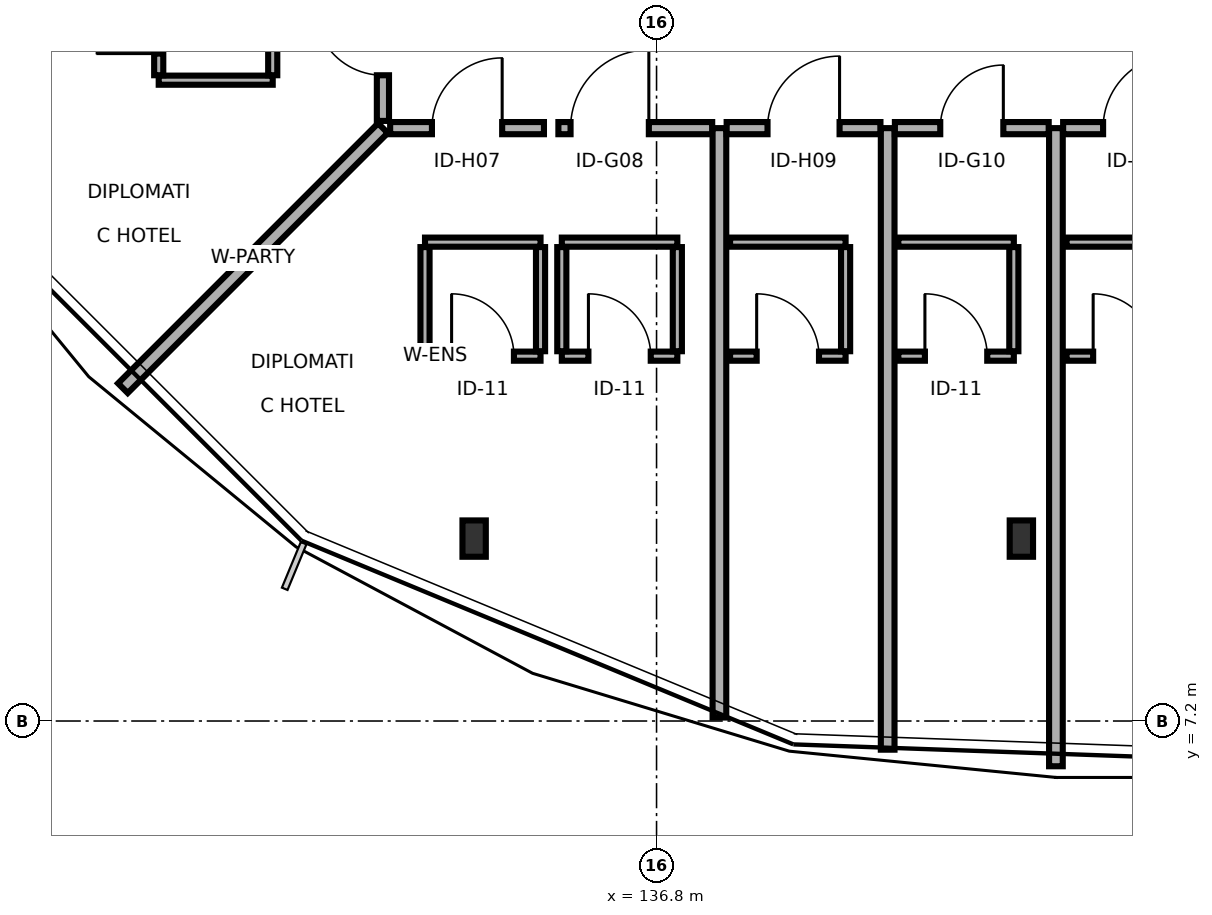
"""IFC4 building model, lengths in metres.
Left out: names, types, materials, properties, quantities, classifications, styles, units other than length and angle.
Written with IfcOpenShell. Run it as: python <this file> out.ifc"""

import sys

from ifc_helpers import new_model, si_unit, direction, frame, frame_2d, origin, origin_2d, place, context, subcontext, project, spatial, rectangle, i_section, extrude, element, fill, save


model = new_model("IFC4")
c1 = context("Model", 3, precision=1e-05, world=origin(), true_north=direction((0.0, 1.0)))
c2 = subcontext(c1, "Body", "Model", "MODEL_VIEW")
j1 = project(units=[si_unit("LENGTHUNIT", "METRE"), si_unit("PLANEANGLEUNIT", "RADIAN")], contexts=[c1])
p1 = place(None, origin())
s1 = spatial("IfcSite", under=j1, at=p1, CompositionType="ELEMENT")
p2 = place(p1, origin())
s2 = spatial("IfcBuilding", under=s1, at=p2, CompositionType="ELEMENT")
p3 = place(p2, frame((0.0, 0.0, 18.1)))
s3 = spatial("IfcBuildingStorey", under=s2, at=p3, CompositionType="ELEMENT", Elevation=18.1)
for number, where, z_axis, x_axis in (
    (1, (134.4, 9.6, 0.0), (0.0, 0.0, 1.0), (1.0, 0.0, 0.0)),
    (2, (141.6, 9.6, 0.0), (0.0, 0.0, 1.0), (1.0, 0.0, 0.0)),
):
    element("IfcColumn", number, at=place(p3, frame(where, z_axis=z_axis, x_axis=x_axis)), inside=s3, PredefinedType="COLUMN", context=c2, shape_type="SweptSolid", body=[
        extrude(i_section(OverallWidth=0.307, OverallDepth=0.478, WebThickness=0.021, FlangeThickness=0.04, FilletRadius=0.027, at=origin_2d()), origin(), (0.0, 0.0, 1.0), 3.4),
    ])
p4 = place(p3, frame((133.295, 15.0, 0.0), z_axis=(0.0, 0.0, 1.0), x_axis=(1.0, 0.0, 0.0)))
e3 = element("IfcWall", 3, at=p4, inside=s3, PredefinedType="PARTITIONING", context=c2, shape_type="SweptSolid", body=[
    extrude(rectangle(XDim=2.024, YDim=0.16, at=frame_2d((1.012, 0.0))), origin(), (0.0, 0.0, 1.0), 3.21),
])
p5 = place(p4, frame((0.55, 0.0, 0.0)))
e4 = element("IfcOpeningElement", 4, at=p5, cuts=e3, PredefinedType="OPENING", context=c2, shape_type="SweptSolid", body=[
    extrude(rectangle(XDim=0.924, YDim=2.16, at=frame_2d((0.462, 1.08))), frame((0.0, 0.09, 0.0), z_axis=(0.0, -1.0, 0.0), x_axis=(1.0, 0.0, 0.0)), (0.0, 0.0, 1.0), 0.18),
])
p6 = place(p3, frame((133.754, 12.0, 0.0), z_axis=(0.0, 0.0, 1.0), x_axis=(1.0, 0.0, 0.0)))
e5 = element("IfcWall", 5, at=p6, inside=s3, PredefinedType="PARTITIONING", context=c2, shape_type="SweptSolid", body=[
    extrude(rectangle(XDim=1.52, YDim=0.12, at=frame_2d((0.76, 0.0))), origin(), (0.0, 0.0, 1.0), 2.745),
])
p7 = place(p6, frame((0.35, 0.0, 0.0)))
e6 = element("IfcOpeningElement", 6, at=p7, cuts=e5, PredefinedType="OPENING", context=c2, shape_type="SweptSolid", body=[
    extrude(rectangle(XDim=0.82, YDim=2.08, at=frame_2d((0.41, 1.04))), frame((0.0, 0.07, 0.0), z_axis=(0.0, -1.0, 0.0), x_axis=(1.0, 0.0, 0.0)), (0.0, 0.0, 1.0), 0.14),
])
p8 = place(p3, frame((133.754, 13.5, 0.0), z_axis=(0.0, 0.0, 1.0), x_axis=(1.0, 0.0, 0.0)))
e7 = element("IfcWall", 7, at=p8, inside=s3, PredefinedType="PARTITIONING", context=c2, shape_type="SweptSolid", body=[
    extrude(rectangle(XDim=1.52, YDim=0.12, at=frame_2d((0.76, 0.0))), origin(), (0.0, 0.0, 1.0), 3.21),
])
p9 = place(p3, frame((133.754, 12.065, 0.0), z_axis=(0.0, 0.0, 1.0), x_axis=(0.0, 1.0, 0.0)))
e8 = element("IfcWall", 8, at=p9, inside=s3, PredefinedType="PARTITIONING", context=c2, shape_type="SweptSolid", body=[
    extrude(rectangle(XDim=1.37, YDim=0.12, at=frame_2d((0.685, 0.0))), origin(), (0.0, 0.0, 1.0), 3.21),
])
p10 = place(p3, frame((135.274, 12.065, 0.0), z_axis=(0.0, 0.0, 1.0), x_axis=(0.0, 1.0, 0.0)))
e9 = element("IfcWall", 9, at=p10, inside=s3, PredefinedType="PARTITIONING", context=c2, shape_type="SweptSolid", body=[
    extrude(rectangle(XDim=1.37, YDim=0.12, at=frame_2d((0.685, 0.0))), origin(), (0.0, 0.0, 1.0), 2.745),
])
p11 = place(p3, frame((133.2, 15.0, 0.0), z_axis=(0.0, 0.0, 1.0), x_axis=(-0.707106781187, -0.707106781187, 0.0)))
e10 = element("IfcWall", 10, at=p11, inside=s3, PredefinedType="PARTITIONING", context=c2, shape_type="SweptSolid", body=[
    extrude(rectangle(XDim=4.839, YDim=0.18, at=frame_2d((2.419, 0.0))), origin(), (0.0, 0.0, 1.0), 2.755),
])
p12 = place(p3, frame((135.509, 15.0, 0.0), z_axis=(0.0, 0.0, 1.0), x_axis=(1.0, 0.0, 0.0)))
e11 = element("IfcWall", 11, at=p12, inside=s3, PredefinedType="PARTITIONING", context=c2, shape_type="SweptSolid", body=[
    extrude(rectangle(XDim=2.024, YDim=0.16, at=frame_2d((1.012, 0.0))), origin(), (0.0, 0.0, 1.0), 2.745),
])
p13 = place(p12, frame((0.16, 0.0, 0.0)))
e12 = element("IfcOpeningElement", 12, at=p13, cuts=e11, PredefinedType="OPENING", context=c2, shape_type="SweptSolid", body=[
    extrude(rectangle(XDim=1.03, YDim=2.05, at=frame_2d((0.515, 1.025))), frame((0.0, 0.09, 0.0), z_axis=(0.0, -1.0, 0.0), x_axis=(1.0, 0.0, 0.0)), (0.0, 0.0, 1.0), 0.18),
])
p14 = place(p3, frame((135.554, 12.0, 0.0), z_axis=(0.0, 0.0, 1.0), x_axis=(1.0, 0.0, 0.0)))
e13 = element("IfcWall", 13, at=p14, inside=s3, PredefinedType="PARTITIONING", context=c2, shape_type="SweptSolid", body=[
    extrude(rectangle(XDim=1.52, YDim=0.12, at=frame_2d((0.76, 0.0))), origin(), (0.0, 0.0, 1.0), 3.21),
])
p15 = place(p14, frame((0.35, 0.0, 0.0)))
e14 = element("IfcOpeningElement", 14, at=p15, cuts=e13, PredefinedType="OPENING", context=c2, shape_type="SweptSolid", body=[
    extrude(rectangle(XDim=0.82, YDim=2.08, at=frame_2d((0.41, 1.04))), frame((0.0, 0.07, 0.0), z_axis=(0.0, -1.0, 0.0), x_axis=(1.0, 0.0, 0.0)), (0.0, 0.0, 1.0), 0.14),
])
p16 = place(p3, frame((135.554, 13.5, 0.0), z_axis=(0.0, 0.0, 1.0), x_axis=(1.0, 0.0, 0.0)))
e15 = element("IfcWall", 15, at=p16, inside=s3, PredefinedType="PARTITIONING", context=c2, shape_type="SweptSolid", body=[
    extrude(rectangle(XDim=1.52, YDim=0.12, at=frame_2d((0.76, 0.0))), origin(), (0.0, 0.0, 1.0), 2.745),
])
p17 = place(p3, frame((135.554, 12.065, 0.0), z_axis=(0.0, 0.0, 1.0), x_axis=(0.0, 1.0, 0.0)))
e16 = element("IfcWall", 16, at=p17, inside=s3, PredefinedType="PARTITIONING", context=c2, shape_type="SweptSolid", body=[
    extrude(rectangle(XDim=1.37, YDim=0.12, at=frame_2d((0.685, 0.0))), origin(), (0.0, 0.0, 1.0), 2.745),
])
p18 = place(p3, frame((137.073, 12.065, 0.0), z_axis=(0.0, 0.0, 1.0), x_axis=(0.0, 1.0, 0.0)))
e17 = element("IfcWall", 17, at=p18, inside=s3, PredefinedType="PARTITIONING", context=c2, shape_type="SweptSolid", body=[
    extrude(rectangle(XDim=1.37, YDim=0.12, at=frame_2d((0.685, 0.0))), origin(), (0.0, 0.0, 1.0), 3.21),
])
p19 = place(p3, frame((137.627, 7.246, 0.0), z_axis=(0.0, 0.0, 1.0), x_axis=(0.0, 1.0, 0.0)))
e18 = element("IfcWall", 18, at=p19, inside=s3, PredefinedType="PARTITIONING", context=c2, shape_type="SweptSolid", body=[
    extrude(rectangle(XDim=7.754, YDim=0.18, at=frame_2d((3.877, 0.0))), origin(), (0.0, 0.0, 1.0), 2.755),
])
p20 = place(p3, frame((137.722, 15.0, 0.0), z_axis=(0.0, 0.0, 1.0), x_axis=(1.0, 0.0, 0.0)))
e19 = element("IfcWall", 19, at=p20, inside=s3, PredefinedType="PARTITIONING", context=c2, shape_type="SweptSolid", body=[
    extrude(rectangle(XDim=2.023, YDim=0.16, at=frame_2d((1.012, 0.0))), origin(), (0.0, 0.0, 1.0), 3.21),
])
p21 = place(p20, frame((0.538, 0.0, 0.0)))
e20 = element("IfcOpeningElement", 20, at=p21, cuts=e19, PredefinedType="OPENING", context=c2, shape_type="SweptSolid", body=[
    extrude(rectangle(XDim=0.948, YDim=2.1, at=frame_2d((0.474, 1.05))), frame((0.0, 0.09, 0.0), z_axis=(0.0, -1.0, 0.0), x_axis=(1.0, 0.0, 0.0)), (0.0, 0.0, 1.0), 0.18),
])
p22 = place(p3, frame((137.767, 12.0, 0.0), z_axis=(0.0, 0.0, 1.0), x_axis=(1.0, 0.0, 0.0)))
e21 = element("IfcWall", 21, at=p22, inside=s3, PredefinedType="PARTITIONING", context=c2, shape_type="SweptSolid", body=[
    extrude(rectangle(XDim=1.52, YDim=0.12, at=frame_2d((0.76, 0.0))), origin(), (0.0, 0.0, 1.0), 3.21),
])
p23 = place(p22, frame((0.35, 0.0, 0.0)))
e22 = element("IfcOpeningElement", 22, at=p23, cuts=e21, PredefinedType="OPENING", context=c2, shape_type="SweptSolid", body=[
    extrude(rectangle(XDim=0.82, YDim=2.08, at=frame_2d((0.41, 1.04))), frame((0.0, 0.07, 0.0), z_axis=(0.0, -1.0, 0.0), x_axis=(1.0, 0.0, 0.0)), (0.0, 0.0, 1.0), 0.14),
])
p24 = place(p3, frame((137.767, 13.5, 0.0), z_axis=(0.0, 0.0, 1.0), x_axis=(1.0, 0.0, 0.0)))
e23 = element("IfcWall", 23, at=p24, inside=s3, PredefinedType="PARTITIONING", context=c2, shape_type="SweptSolid", body=[
    extrude(rectangle(XDim=1.52, YDim=0.12, at=frame_2d((0.76, 0.0))), origin(), (0.0, 0.0, 1.0), 3.21),
])
p25 = place(p3, frame((139.287, 12.065, 0.0), z_axis=(0.0, 0.0, 1.0), x_axis=(0.0, 1.0, 0.0)))
e24 = element("IfcWall", 24, at=p25, inside=s3, PredefinedType="PARTITIONING", context=c2, shape_type="SweptSolid", body=[
    extrude(rectangle(XDim=1.37, YDim=0.12, at=frame_2d((0.685, 0.0))), origin(), (0.0, 0.0, 1.0), 3.21),
])
p26 = place(p3, frame((139.841, 6.823, 0.0), z_axis=(0.0, 0.0, 1.0), x_axis=(0.0, 1.0, 0.0)))
e25 = element("IfcWall", 25, at=p26, inside=s3, PredefinedType="PARTITIONING", context=c2, shape_type="SweptSolid", body=[
    extrude(rectangle(XDim=8.177, YDim=0.18, at=frame_2d((4.089, 0.0))), origin(), (0.0, 0.0, 1.0), 2.755),
])
p27 = place(p3, frame((139.936, 15.0, 0.0), z_axis=(0.0, 0.0, 1.0), x_axis=(1.0, 0.0, 0.0)))
e26 = element("IfcWall", 26, at=p27, inside=s3, PredefinedType="PARTITIONING", context=c2, shape_type="SweptSolid", body=[
    extrude(rectangle(XDim=2.024, YDim=0.16, at=frame_2d((1.012, 0.0))), origin(), (0.0, 0.0, 1.0), 2.745),
])
p28 = place(p27, frame((0.597, 0.0, 0.0)))
e27 = element("IfcOpeningElement", 27, at=p28, cuts=e26, PredefinedType="OPENING", context=c2, shape_type="SweptSolid", body=[
    extrude(rectangle(XDim=0.83, YDim=2.11, at=frame_2d((0.415, 1.055))), frame((0.0, 0.09, 0.0), z_axis=(0.0, -1.0, 0.0), x_axis=(1.0, 0.0, 0.0)), (0.0, 0.0, 1.0), 0.18),
])
p29 = place(p3, frame((139.981, 12.0, 0.0), z_axis=(0.0, 0.0, 1.0), x_axis=(1.0, 0.0, 0.0)))
e28 = element("IfcWall", 28, at=p29, inside=s3, PredefinedType="PARTITIONING", context=c2, shape_type="SweptSolid", body=[
    extrude(rectangle(XDim=1.52, YDim=0.12, at=frame_2d((0.76, 0.0))), origin(), (0.0, 0.0, 1.0), 2.745),
])
p30 = place(p29, frame((0.35, 0.0, 0.0)))
e29 = element("IfcOpeningElement", 29, at=p30, cuts=e28, PredefinedType="OPENING", context=c2, shape_type="SweptSolid", body=[
    extrude(rectangle(XDim=0.82, YDim=2.08, at=frame_2d((0.41, 1.04))), frame((0.0, 0.07, 0.0), z_axis=(0.0, -1.0, 0.0), x_axis=(1.0, 0.0, 0.0)), (0.0, 0.0, 1.0), 0.14),
])
p31 = place(p3, frame((139.981, 13.5, 0.0), z_axis=(0.0, 0.0, 1.0), x_axis=(1.0, 0.0, 0.0)))
e30 = element("IfcWall", 30, at=p31, inside=s3, PredefinedType="PARTITIONING", context=c2, shape_type="SweptSolid", body=[
    extrude(rectangle(XDim=1.52, YDim=0.12, at=frame_2d((0.76, 0.0))), origin(), (0.0, 0.0, 1.0), 2.745),
])
p32 = place(p3, frame((141.501, 12.065, 0.0), z_axis=(0.0, 0.0, 1.0), x_axis=(0.0, 1.0, 0.0)))
e31 = element("IfcWall", 31, at=p32, inside=s3, PredefinedType="PARTITIONING", context=c2, shape_type="SweptSolid", body=[
    extrude(rectangle(XDim=1.37, YDim=0.12, at=frame_2d((0.685, 0.0))), origin(), (0.0, 0.0, 1.0), 2.745),
])
p33 = place(p3, frame((142.054, 6.605, 0.0), z_axis=(0.0, 0.0, 1.0), x_axis=(0.0, 1.0, 0.0)))
e32 = element("IfcWall", 32, at=p33, inside=s3, PredefinedType="PARTITIONING", context=c2, shape_type="SweptSolid", body=[
    extrude(rectangle(XDim=8.395, YDim=0.18, at=frame_2d((4.198, 0.0))), origin(), (0.0, 0.0, 1.0), 2.755),
])
p34 = place(p3, frame((142.149, 15.0, 0.0), z_axis=(0.0, 0.0, 1.0), x_axis=(1.0, 0.0, 0.0)))
e33 = element("IfcWall", 33, at=p34, inside=s3, PredefinedType="PARTITIONING", context=c2, shape_type="SweptSolid", body=[
    extrude(rectangle(XDim=2.024, YDim=0.16, at=frame_2d((1.012, 0.0))), origin(), (0.0, 0.0, 1.0), 3.21),
])
p35 = place(p34, frame((0.526, 0.0, 0.0)))
e34 = element("IfcOpeningElement", 34, at=p35, cuts=e33, PredefinedType="OPENING", context=c2, shape_type="SweptSolid", body=[
    extrude(rectangle(XDim=0.972, YDim=2.16, at=frame_2d((0.486, 1.08))), frame((0.0, 0.09, 0.0), z_axis=(0.0, -1.0, 0.0), x_axis=(1.0, 0.0, 0.0)), (0.0, 0.0, 1.0), 0.18),
])
p36 = place(p3, frame((142.195, 12.0, 0.0), z_axis=(0.0, 0.0, 1.0), x_axis=(1.0, 0.0, 0.0)))
e35 = element("IfcWall", 35, at=p36, inside=s3, PredefinedType="PARTITIONING", context=c2, shape_type="SweptSolid", body=[
    extrude(rectangle(XDim=1.52, YDim=0.12, at=frame_2d((0.76, 0.0))), origin(), (0.0, 0.0, 1.0), 3.21),
])
p37 = place(p36, frame((0.35, 0.0, 0.0)))
e36 = element("IfcOpeningElement", 36, at=p37, cuts=e35, PredefinedType="OPENING", context=c2, shape_type="SweptSolid", body=[
    extrude(rectangle(XDim=0.82, YDim=2.08, at=frame_2d((0.41, 1.04))), frame((0.0, 0.07, 0.0), z_axis=(0.0, -1.0, 0.0), x_axis=(1.0, 0.0, 0.0)), (0.0, 0.0, 1.0), 0.14),
])
p38 = place(p3, frame((142.195, 13.5, 0.0), z_axis=(0.0, 0.0, 1.0), x_axis=(1.0, 0.0, 0.0)))
e37 = element("IfcWall", 37, at=p38, inside=s3, PredefinedType="PARTITIONING", context=c2, shape_type="SweptSolid", body=[
    extrude(rectangle(XDim=1.52, YDim=0.12, at=frame_2d((0.76, 0.0))), origin(), (0.0, 0.0, 1.0), 3.21),
])
p39 = place(p3, frame((133.2, 15.095, 0.0), z_axis=(0.0, 0.0, 1.0), x_axis=(0.0, 1.0, 0.0)))
e38 = element("IfcWall", 38, at=p39, inside=s3, PredefinedType="PARTITIONING", context=c2, shape_type="SweptSolid", body=[
    extrude(rectangle(XDim=2.101, YDim=0.16, at=frame_2d((1.05, 0.0))), origin(), (0.0, 0.0, 1.0), 2.745),
])
p40 = place(p39, frame((0.601, 0.0, 0.0)))
e39 = element("IfcOpeningElement", 39, at=p40, cuts=e38, PredefinedType="OPENING", context=c2, shape_type="SweptSolid", body=[
    extrude(rectangle(XDim=0.9, YDim=2.1, at=frame_2d((0.45, 1.05))), frame((0.0, 0.09, 0.0), z_axis=(0.0, -1.0, 0.0), x_axis=(1.0, 0.0, 0.0)), (0.0, 0.0, 1.0), 0.18),
])
p41 = place(p3, frame((130.25, 15.631, 0.0), z_axis=(0.0, 0.0, 1.0), x_axis=(1.0, 0.0, 0.0)))
e40 = element("IfcWall", 40, at=p41, inside=s3, PredefinedType="PARTITIONING", context=c2, shape_type="SweptSolid", body=[
    extrude(rectangle(XDim=1.5, YDim=0.12, at=frame_2d((0.75, 0.0))), origin(), (0.0, 0.0, 1.0), 3.21),
])
p42 = place(p3, frame((130.25, 15.696, 0.0), z_axis=(0.0, 0.0, 1.0), x_axis=(0.0, 1.0, 0.0)))
e41 = element("IfcWall", 41, at=p42, inside=s3, PredefinedType="PARTITIONING", context=c2, shape_type="SweptSolid", body=[
    extrude(rectangle(XDim=1.39, YDim=0.12, at=frame_2d((0.695, 0.0))), origin(), (0.0, 0.0, 1.0), 2.745),
])
p43 = place(p42, frame((0.285, 0.0, 0.0)))
e42 = element("IfcOpeningElement", 42, at=p43, cuts=e41, PredefinedType="OPENING", context=c2, shape_type="SweptSolid", body=[
    extrude(rectangle(XDim=0.82, YDim=2.08, at=frame_2d((0.41, 1.04))), frame((0.0, 0.07, 0.0), z_axis=(0.0, -1.0, 0.0), x_axis=(1.0, 0.0, 0.0)), (0.0, 0.0, 1.0), 0.14),
])
p44 = place(p3, frame((131.75, 15.696, 0.0), z_axis=(0.0, 0.0, 1.0), x_axis=(0.0, 1.0, 0.0)))
e43 = element("IfcWall", 43, at=p44, inside=s3, PredefinedType="PARTITIONING", context=c2, shape_type="SweptSolid", body=[
    extrude(rectangle(XDim=1.39, YDim=0.12, at=frame_2d((0.695, 0.0))), origin(), (0.0, 0.0, 1.0), 2.745),
])
p45 = place(p5, origin())
e44 = element("IfcDoor", 44, at=p45, inside=s3, OperationType="SINGLE_SWING_RIGHT", PredefinedType="DOOR", context=c2, shape_type="SweptSolid", body=[
    extrude(rectangle(XDim=0.924, YDim=2.16, at=frame_2d((0.462, 1.08))), frame((0.0, 0.025, 0.0), z_axis=(0.0, -1.0, 0.0), x_axis=(1.0, 0.0, 0.0)), (0.0, 0.0, 1.0), 0.05),
])
fill(e4, e44)
p46 = place(p7, origin())
e45 = element("IfcDoor", 45, at=p46, inside=s3, OperationType="SINGLE_SWING_LEFT", PredefinedType="DOOR", context=c2, shape_type="SweptSolid", body=[
    extrude(rectangle(XDim=0.82, YDim=2.08, at=frame_2d((0.41, 1.04))), frame((0.0, 0.025, 0.0), z_axis=(0.0, -1.0, 0.0), x_axis=(1.0, 0.0, 0.0)), (0.0, 0.0, 1.0), 0.05),
])
fill(e6, e45)
p47 = place(p13, origin())
e46 = element("IfcDoor", 46, at=p47, inside=s3, OperationType="SINGLE_SWING_RIGHT", PredefinedType="DOOR", context=c2, shape_type="SweptSolid", body=[
    extrude(rectangle(XDim=1.03, YDim=2.05, at=frame_2d((0.515, 1.025))), frame((0.0, 0.025, 0.0), z_axis=(0.0, -1.0, 0.0), x_axis=(1.0, 0.0, 0.0)), (0.0, 0.0, 1.0), 0.05),
])
fill(e12, e46)
p48 = place(p15, origin())
e47 = element("IfcDoor", 47, at=p48, inside=s3, OperationType="SINGLE_SWING_LEFT", PredefinedType="DOOR", context=c2, shape_type="SweptSolid", body=[
    extrude(rectangle(XDim=0.82, YDim=2.08, at=frame_2d((0.41, 1.04))), frame((0.0, 0.025, 0.0), z_axis=(0.0, -1.0, 0.0), x_axis=(1.0, 0.0, 0.0)), (0.0, 0.0, 1.0), 0.05),
])
fill(e14, e47)
p49 = place(p21, origin())
e48 = element("IfcDoor", 48, at=p49, inside=s3, OperationType="SINGLE_SWING_RIGHT", PredefinedType="DOOR", context=c2, shape_type="SweptSolid", body=[
    extrude(rectangle(XDim=0.948, YDim=2.1, at=frame_2d((0.474, 1.05))), frame((0.0, 0.025, 0.0), z_axis=(0.0, -1.0, 0.0), x_axis=(1.0, 0.0, 0.0)), (0.0, 0.0, 1.0), 0.05),
])
fill(e20, e48)
p50 = place(p23, origin())
e49 = element("IfcDoor", 49, at=p50, inside=s3, OperationType="SINGLE_SWING_LEFT", PredefinedType="DOOR", context=c2, shape_type="SweptSolid", body=[
    extrude(rectangle(XDim=0.82, YDim=2.08, at=frame_2d((0.41, 1.04))), frame((0.0, 0.025, 0.0), z_axis=(0.0, -1.0, 0.0), x_axis=(1.0, 0.0, 0.0)), (0.0, 0.0, 1.0), 0.05),
])
fill(e22, e49)
p51 = place(p28, origin())
e50 = element("IfcDoor", 50, at=p51, inside=s3, OperationType="SINGLE_SWING_RIGHT", PredefinedType="DOOR", context=c2, shape_type="SweptSolid", body=[
    extrude(rectangle(XDim=0.83, YDim=2.11, at=frame_2d((0.415, 1.055))), frame((0.0, 0.025, 0.0), z_axis=(0.0, -1.0, 0.0), x_axis=(1.0, 0.0, 0.0)), (0.0, 0.0, 1.0), 0.05),
])
fill(e27, e50)
p52 = place(p30, origin())
e51 = element("IfcDoor", 51, at=p52, inside=s3, OperationType="SINGLE_SWING_LEFT", PredefinedType="DOOR", context=c2, shape_type="SweptSolid", body=[
    extrude(rectangle(XDim=0.82, YDim=2.08, at=frame_2d((0.41, 1.04))), frame((0.0, 0.025, 0.0), z_axis=(0.0, -1.0, 0.0), x_axis=(1.0, 0.0, 0.0)), (0.0, 0.0, 1.0), 0.05),
])
fill(e29, e51)
p53 = place(p35, origin())
e52 = element("IfcDoor", 52, at=p53, inside=s3, OperationType="SINGLE_SWING_RIGHT", PredefinedType="DOOR", context=c2, shape_type="SweptSolid", body=[
    extrude(rectangle(XDim=0.972, YDim=2.16, at=frame_2d((0.486, 1.08))), frame((0.0, 0.025, 0.0), z_axis=(0.0, -1.0, 0.0), x_axis=(1.0, 0.0, 0.0)), (0.0, 0.0, 1.0), 0.05),
])
fill(e34, e52)
p54 = place(p37, origin())
e53 = element("IfcDoor", 53, at=p54, inside=s3, OperationType="SINGLE_SWING_LEFT", PredefinedType="DOOR", context=c2, shape_type="SweptSolid", body=[
    extrude(rectangle(XDim=0.82, YDim=2.08, at=frame_2d((0.41, 1.04))), frame((0.0, 0.025, 0.0), z_axis=(0.0, -1.0, 0.0), x_axis=(1.0, 0.0, 0.0)), (0.0, 0.0, 1.0), 0.05),
])
fill(e36, e53)
p55 = place(p40, origin())
e54 = element("IfcDoor", 54, at=p55, inside=s3, OperationType="SINGLE_SWING_RIGHT", PredefinedType="DOOR", context=c2, shape_type="SweptSolid", body=[
    extrude(rectangle(XDim=0.9, YDim=2.1, at=frame_2d((0.45, 1.05))), frame((0.0, 0.025, 0.0), z_axis=(0.0, -1.0, 0.0), x_axis=(1.0, 0.0, 0.0)), (0.0, 0.0, 1.0), 0.05),
])
fill(e39, e54)
p56 = place(p43, origin())
e55 = element("IfcDoor", 55, at=p56, inside=s3, OperationType="SINGLE_SWING_LEFT", PredefinedType="DOOR", context=c2, shape_type="SweptSolid", body=[
    extrude(rectangle(XDim=0.82, YDim=2.08, at=frame_2d((0.41, 1.04))), frame((0.0, 0.025, 0.0), z_axis=(0.0, -1.0, 0.0), x_axis=(1.0, 0.0, 0.0)), (0.0, 0.0, 1.0), 0.05),
])
fill(e42, e55)
save(model, sys.argv[1])
